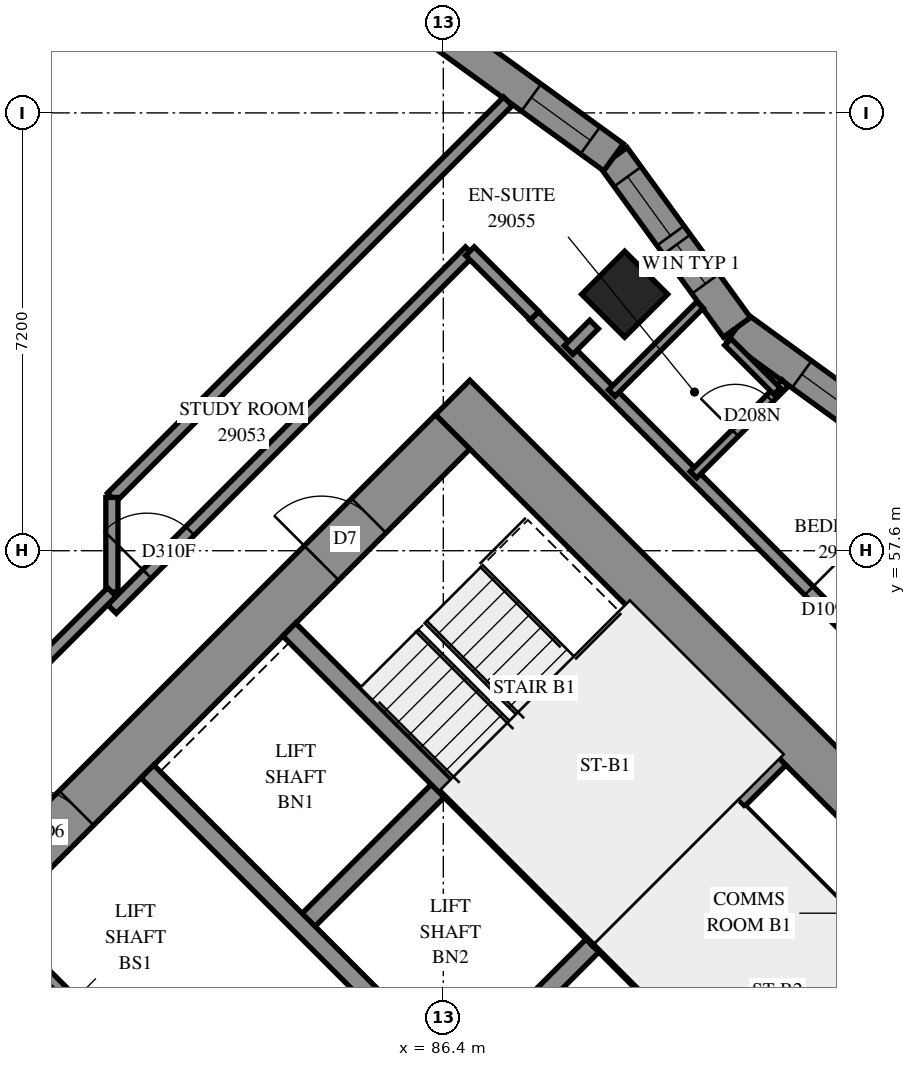
"""IFC4 building model, lengths in metres.
Left out: names, types, materials, properties, quantities, classifications, styles, units other than length and angle.
Written with IfcOpenShell. Run it as: python <this file> out.ifc"""

import sys

from ifc_helpers import new_model, si_unit, direction, frame, frame_2d, origin, origin_2d, place, context, subcontext, project, spatial, polyline, rectangle, outline, extrude, element, fill, save


model = new_model("IFC4")
c1 = context("Model", 3, precision=1e-05, world=origin(), true_north=direction((0.0, 1.0)))
c2 = subcontext(c1, "Body", "Model", "MODEL_VIEW")
j1 = project(units=[si_unit("LENGTHUNIT", "METRE"), si_unit("PLANEANGLEUNIT", "RADIAN")], contexts=[c1])
p1 = place(None, origin())
s1 = spatial("IfcSite", under=j1, at=p1, CompositionType="ELEMENT")
p2 = place(p1, origin())
s2 = spatial("IfcBuilding", under=s1, at=p2, CompositionType="ELEMENT")
p3 = place(p2, frame((0.0, 0.0, 108.4)))
s3 = spatial("IfcBuildingStorey", under=s2, at=p3, CompositionType="ELEMENT", Elevation=108.4)
p4 = place(p3, frame((89.382, 61.818, 0.0), z_axis=(0.0, 0.0, 1.0), x_axis=(0.7071067812, -0.7071067812, 0.0)))
e1 = element("IfcColumn", 1, at=p4, inside=s3, PredefinedType="COLUMN", context=c2, shape_type="SweptSolid", body=[
    extrude(rectangle(XDim=1.0, YDim=1.0, at=origin_2d()), origin(), (0.0, 0.0, 1.0), 3.1),
])
p5 = place(p3, frame((86.554, 60.121, -0.3), z_axis=(0.0, 0.0, 1.0), x_axis=(0.7071067812, -0.7071067812, 0.0)))
e2 = element("IfcWall", 2, at=p5, inside=s3, PredefinedType="SHEAR", context=c2, shape_type="SweptSolid", body=[
    extrude(rectangle(XDim=16.0, YDim=0.8, at=frame_2d((8.0, 0.0))), origin(), (0.0, 0.0, 1.0), 2.7),
])
p6 = place(p5, frame((10.8, 0.0, 0.3)))
e3 = element("IfcOpeningElement", 3, at=p6, cuts=e2, PredefinedType="OPENING", context=c2, shape_type="SweptSolid", body=[
    extrude(rectangle(XDim=0.8, YDim=2.1, at=frame_2d((0.4, 1.05))), frame((0.0, 0.41, 0.0), z_axis=(0.0, -1.0, 0.0), x_axis=(1.0, 0.0, 0.0)), (0.0, 0.0, 1.0), 0.82),
])
p7 = place(p3, frame((76.372, 49.373, -0.3), z_axis=(0.0, 0.0, 1.0), x_axis=(0.7071067812, 0.7071067812, 0.0)))
e4 = element("IfcWall", 4, at=p7, inside=s3, PredefinedType="SHEAR", context=c2, shape_type="SweptSolid", body=[
    extrude(rectangle(XDim=14.4, YDim=0.8, at=frame_2d((7.2, 0.0))), origin(), (0.0, 0.0, 1.0), 2.7),
])
p8 = place(p7, frame((4.55, 0.0, 0.3)))
e5 = element("IfcOpeningElement", 5, at=p8, cuts=e4, PredefinedType="OPENING", context=c2, shape_type="SweptSolid", body=[
    extrude(rectangle(XDim=1.1, YDim=2.1, at=frame_2d((0.55, 1.05))), frame((0.0, 0.41, 0.0), z_axis=(0.0, -1.0, 0.0), x_axis=(1.0, 0.0, 0.0)), (0.0, 0.0, 1.0), 0.82),
])
p9 = place(p7, frame((11.35, 0.0, 0.3)))
e6 = element("IfcOpeningElement", 6, at=p9, cuts=e4, PredefinedType="OPENING", context=c2, shape_type="SweptSolid", body=[
    extrude(rectangle(XDim=1.1, YDim=2.1, at=frame_2d((0.55, 1.05))), frame((0.0, 0.41, 0.0), z_axis=(0.0, -1.0, 0.0), x_axis=(1.0, 0.0, 0.0)), (0.0, 0.0, 1.0), 0.82),
])
p10 = place(p3, frame((84.079, 51.423, 0.0), z_axis=(0.0, 0.0, 1.0), x_axis=(0.7071219326, 0.7070916295, 0.0)))
e7 = element("IfcWall", 7, at=p10, inside=s3, PredefinedType="SOLIDWALL", context=c2, shape_type="SweptSolid", body=[
    extrude(rectangle(XDim=3.3, YDim=0.3, at=frame_2d((1.65, 0.0))), origin(), (0.0, 0.0, 1.0), 3.1),
])
p11 = place(p3, frame((86.625, 48.878, 0.0), z_axis=(0.0, 0.0, 1.0), x_axis=(0.7071067812, 0.7071067812, 0.0)))
e8 = element("IfcWall", 8, at=p11, inside=s3, PredefinedType="SOLIDWALL", context=c2, shape_type="SweptSolid", body=[
    extrude(rectangle(XDim=3.3, YDim=0.3, at=frame_2d((1.65, 0.0))), origin(), (0.0, 0.0, 1.0), 3.1),
])
p12 = place(p3, frame((78.988, 51.423, 0.0), z_axis=(0.0, 0.0, 1.0), x_axis=(0.7071067812, -0.7071067812, 0.0)))
e9 = element("IfcWall", 9, at=p12, inside=s3, PredefinedType="SOLIDWALL", context=c2, shape_type="SweptSolid", body=[
    extrude(rectangle(XDim=14.4, YDim=0.3, at=frame_2d((7.2, 0.0))), origin(), (0.0, 0.0, 1.0), 3.1),
])
p13 = place(p12, frame((1.25, 0.0, 0.0)))
e10 = element("IfcOpeningElement", 10, at=p13, cuts=e9, PredefinedType="OPENING", context=c2, shape_type="SweptSolid", body=[
    extrude(rectangle(XDim=1.1, YDim=2.1, at=frame_2d((0.55, 1.05))), frame((0.0, 0.16, 0.0), z_axis=(0.0, -1.0, 0.0), x_axis=(1.0, 0.0, 0.0)), (0.0, 0.0, 1.0), 0.32),
])
p14 = place(p12, frame((4.85, 0.0, 0.0)))
e11 = element("IfcOpeningElement", 11, at=p14, cuts=e9, PredefinedType="OPENING", context=c2, shape_type="SweptSolid", body=[
    extrude(rectangle(XDim=1.1, YDim=2.1, at=frame_2d((0.55, 1.05))), frame((0.0, 0.16, 0.0), z_axis=(0.0, -1.0, 0.0), x_axis=(1.0, 0.0, 0.0)), (0.0, 0.0, 1.0), 0.32),
])
p15 = place(p12, frame((8.45, 0.0, 0.0)))
e12 = element("IfcOpeningElement", 12, at=p15, cuts=e9, PredefinedType="OPENING", context=c2, shape_type="SweptSolid", body=[
    extrude(rectangle(XDim=1.1, YDim=2.1, at=frame_2d((0.55, 1.05))), frame((0.0, 0.16, 0.0), z_axis=(0.0, -1.0, 0.0), x_axis=(1.0, 0.0, 0.0)), (0.0, 0.0, 1.0), 0.32),
])
p16 = place(p12, frame((12.05, 0.0, 0.0)))
e13 = element("IfcOpeningElement", 13, at=p16, cuts=e9, PredefinedType="OPENING", context=c2, shape_type="SweptSolid", body=[
    extrude(rectangle(XDim=1.1, YDim=2.1, at=frame_2d((0.55, 1.05))), frame((0.0, 0.16, 0.0), z_axis=(0.0, -1.0, 0.0), x_axis=(1.0, 0.0, 0.0)), (0.0, 0.0, 1.0), 0.32),
])
p17 = place(p3, frame((81.534, 53.969, 0.0), z_axis=(0.0, 0.0, 1.0), x_axis=(0.707103309, -0.7071102534, 0.0)))
e14 = element("IfcWall", 14, at=p17, inside=s3, PredefinedType="SOLIDWALL", context=c2, shape_type="SweptSolid", body=[
    extrude(rectangle(XDim=14.4, YDim=0.3, at=frame_2d((7.2, 0.0))), origin(), (0.0, 0.0, 1.0), 3.1),
])
p18 = place(p17, frame((12.05, 0.0, 0.0)))
e15 = element("IfcOpeningElement", 15, at=p18, cuts=e14, PredefinedType="OPENING", context=c2, shape_type="SweptSolid", body=[
    extrude(rectangle(XDim=1.1, YDim=2.1, at=frame_2d((0.55, 1.05))), frame((0.0, 0.16, 0.0), z_axis=(0.0, -1.0, 0.0), x_axis=(1.0, 0.0, 0.0)), (0.0, 0.0, 1.0), 0.32),
])
for number, where, z_axis, x_axis in (
    (16, (83.867, 56.302, 0.0), (0.0, 0.0, 1.0), (0.707, -0.707, 0.0)),
    (17, (88.958, 51.211, 0.0), (0.0, 0.0, 1.0), (0.707, -0.707, 0.0)),
):
    element("IfcWall", number, at=place(p3, frame(where, z_axis=z_axis, x_axis=x_axis)), inside=s3, PredefinedType="SOLIDWALL", context=c2, shape_type="SweptSolid", body=[
        extrude(rectangle(XDim=7.2, YDim=0.3, at=frame_2d((3.6, 0.0))), origin(), (0.0, 0.0, 1.0), 3.1),
    ])
p19 = place(p3, frame((88.958, 51.211, 0.0), z_axis=(0.0, 0.0, 1.0), x_axis=(0.7071067812, 0.7071067812, 0.0)))
e18 = element("IfcWall", 18, at=p19, inside=s3, PredefinedType="SOLIDWALL", context=c2, shape_type="SweptSolid", body=[
    extrude(rectangle(XDim=4.2, YDim=0.3, at=frame_2d((2.1, 0.0))), origin(), (0.0, 0.0, 1.0), 3.1),
])
p20 = place(p3, frame((94.025, 59.244, 0.0), z_axis=(0.0, 0.0, 1.0), x_axis=(-0.8092802019, 0.5874228075, 0.0)))
e19 = element("IfcWall", 19, at=p20, inside=s3, PredefinedType="SOLIDWALL", context=c2, shape_type="SweptSolid", body=[
    extrude(outline(polyline([(-0.044, -0.275), (3.411, -0.275), (3.499, 0.275), (0.044, 0.275), (-0.044, -0.275)])), origin(), (0.0, 0.0, 1.0), 3.1),
])
p21 = place(p20, frame((0.938, 0.0, 0.5)))
e20 = element("IfcOpeningElement", 20, at=p21, cuts=e19, PredefinedType="OPENING", context=c2, shape_type="SweptSolid", body=[
    extrude(rectangle(XDim=1.2, YDim=2.45, at=frame_2d((0.6, 1.225))), frame((0.0, 0.285, 0.0), z_axis=(0.0, -1.0, 0.0), x_axis=(1.0, 0.0, 0.0)), (0.0, 0.0, 1.0), 0.57),
])
p22 = place(p3, frame((91.23, 61.274, 0.0), z_axis=(0.0, 0.0, 1.0), x_axis=(-0.5874228075, 0.8092802019, 0.0)))
e21 = element("IfcWall", 21, at=p22, inside=s3, PredefinedType="SOLIDWALL", context=c2, shape_type="SweptSolid", body=[
    extrude(outline(polyline([(0.044, -0.275), (3.499, -0.275), (3.411, 0.275), (-0.044, 0.275), (0.044, -0.275)])), origin(), (0.0, 0.0, 1.0), 3.1),
])
p23 = place(p22, frame((1.862, 0.0, 0.5)))
e22 = element("IfcOpeningElement", 22, at=p23, cuts=e21, PredefinedType="OPENING", context=c2, shape_type="SweptSolid", body=[
    extrude(rectangle(XDim=1.2, YDim=2.45, at=frame_2d((0.6, 1.225))), frame((0.0, 0.285, 0.0), z_axis=(0.0, -1.0, 0.0), x_axis=(1.0, 0.0, 0.0)), (0.0, 0.0, 1.0), 0.57),
])
p24 = place(p22, frame((0.883, 0.0, 0.45)))
e23 = element("IfcOpeningElement", 23, at=p24, cuts=e21, PredefinedType="OPENING", context=c2, shape_type="SweptSolid", body=[
    extrude(rectangle(XDim=0.8, YDim=2.5, at=frame_2d((0.4, 1.25))), frame((0.0, 0.285, 0.0), z_axis=(0.0, -1.0, 0.0), x_axis=(1.0, 0.0, 0.0)), (0.0, 0.0, 1.0), 0.57),
])
p25 = place(p3, frame((89.2, 64.07, 0.0), z_axis=(0.0, 0.0, 1.0), x_axis=(-0.8092802019, 0.5874228075, 0.0)))
e24 = element("IfcWall", 24, at=p25, inside=s3, PredefinedType="SOLIDWALL", context=c2, shape_type="SweptSolid", body=[
    extrude(outline(polyline([(-0.044, -0.275), (3.411, -0.275), (3.499, 0.275), (0.044, 0.275), (-0.044, -0.275)])), origin(), (0.0, 0.0, 1.0), 3.1),
])
p26 = place(p25, frame((0.473, 0.0, 0.5)))
e25 = element("IfcOpeningElement", 25, at=p26, cuts=e24, PredefinedType="OPENING", context=c2, shape_type="SweptSolid", body=[
    extrude(rectangle(XDim=1.2, YDim=2.45, at=frame_2d((0.6, 1.225))), frame((0.0, 0.285, 0.0), z_axis=(0.0, -1.0, 0.0), x_axis=(1.0, 0.0, 0.0)), (0.0, 0.0, 1.0), 0.57),
])
p27 = place(p3, frame((91.313, 53.354, 0.0), z_axis=(0.0, 0.0, 1.0), x_axis=(0.7071067812, -0.7071067812, 0.0)))
e26 = element("IfcWall", 26, at=p27, inside=s3, PredefinedType="PARTITIONING", context=c2, shape_type="SweptSolid", body=[
    extrude(rectangle(XDim=5.95, YDim=0.15, at=frame_2d((2.975, 0.0))), origin(), (0.0, 0.0, 1.0), 3.1),
])
p28 = place(p3, frame((87.894, 61.461, 0.0), z_axis=(0.0, 0.0, 1.0), x_axis=(0.7071067812, -0.7071067812, 0.0)))
e27 = element("IfcWall", 27, at=p28, inside=s3, PredefinedType="PARTITIONING", context=c2, shape_type="SweptSolid", body=[
    extrude(rectangle(XDim=10.428, YDim=0.2, at=frame_2d((5.214, 0.0))), origin(), (0.0, 0.0, 1.0), 3.1),
])
p29 = place(p28, frame((6.39, 0.0, 0.0)))
e28 = element("IfcOpeningElement", 28, at=p29, cuts=e27, PredefinedType="OPENING", context=c2, shape_type="SweptSolid", body=[
    extrude(rectangle(XDim=0.9, YDim=2.1, at=frame_2d((0.45, 1.05))), frame((0.0, 0.11, 0.0), z_axis=(0.0, -1.0, 0.0), x_axis=(1.0, 0.0, 0.0)), (0.0, 0.0, 1.0), 0.22),
])
p30 = place(p3, frame((80.949, 58.477, 0.0), z_axis=(0.0, 0.0, 1.0), x_axis=(0.7071067812, 0.7071067812, 0.0)))
e29 = element("IfcWall", 29, at=p30, inside=s3, PredefinedType="PARTITIONING", context=c2, shape_type="SweptSolid", body=[
    extrude(rectangle(XDim=9.212, YDim=0.2, at=frame_2d((4.606, 0.0))), origin(), (0.0, 0.0, 1.0), 3.1),
])
p31 = place(p3, frame((80.951, 56.641, 0.0), z_axis=(0.0, 0.0, 1.0), x_axis=(0.7071067812, 0.7071067812, 0.0)))
e30 = element("IfcWall", 30, at=p31, inside=s3, PredefinedType="PARTITIONING", context=c2, shape_type="SweptSolid", body=[
    extrude(rectangle(XDim=8.321, YDim=0.2, at=frame_2d((4.161, 0.0))), origin(), (0.0, 0.0, 1.0), 3.1),
])
p32 = place(p31, frame((0.816, 0.0, 0.0)))
e31 = element("IfcOpeningElement", 31, at=p32, cuts=e30, PredefinedType="OPENING", context=c2, shape_type="SweptSolid", body=[
    extrude(rectangle(XDim=1.0, YDim=2.1, at=frame_2d((0.5, 1.05))), frame((0.0, 0.11, 0.0), z_axis=(0.0, -1.0, 0.0), x_axis=(1.0, 0.0, 0.0)), (0.0, 0.0, 1.0), 0.22),
])
p33 = place(p3, frame((90.513, 58.849, 0.0), z_axis=(0.0, 0.0, 1.0), x_axis=(0.7071302035, 0.7070833581, 0.0)))
e32 = element("IfcWall", 32, at=p33, inside=s3, PredefinedType="PARTITIONING", context=c2, shape_type="SweptSolid", body=[
    extrude(rectangle(XDim=2.135, YDim=0.15, at=frame_2d((1.067, 0.0))), origin(), (0.0, 0.0, 1.0), 3.1),
])
p34 = place(p33, frame((0.972, 0.0, 0.0)))
e33 = element("IfcOpeningElement", 33, at=p34, cuts=e32, PredefinedType="OPENING", context=c2, shape_type="SweptSolid", body=[
    extrude(rectangle(XDim=0.8, YDim=2.1, at=frame_2d((0.4, 1.05))), frame((0.0, 0.085, 0.0), z_axis=(0.0, -1.0, 0.0), x_axis=(1.0, 0.0, 0.0)), (0.0, 0.0, 1.0), 0.17),
])
p35 = place(p3, frame((89.169, 60.193, 0.0), z_axis=(0.0, 0.0, 1.0), x_axis=(0.7076425233, 0.7065706329, 0.0)))
e34 = element("IfcWall", 34, at=p35, inside=s3, PredefinedType="PARTITIONING", context=c2, shape_type="SweptSolid", body=[
    extrude(rectangle(XDim=2.052, YDim=0.15, at=frame_2d((1.026, 0.0))), origin(), (0.0, 0.0, 1.0), 3.1),
])
p36 = place(p3, frame((80.95, 56.92, 0.0), z_axis=(0.0, 0.0, 1.0), x_axis=(0.0, 1.0, 0.0)))
e35 = element("IfcWall", 35, at=p36, inside=s3, PredefinedType="PARTITIONING", context=c2, shape_type="SweptSolid", body=[
    extrude(rectangle(XDim=1.556, YDim=0.2, at=frame_2d((0.778, 0.0))), origin(), (0.0, 0.0, 1.0), 3.1),
])
p37 = place(p3, frame((79.879, 55.851, 0.0), z_axis=(0.0, 0.0, 1.0), x_axis=(0.7071067812, 0.7071067812, 0.0)))
e36 = element("IfcWall", 36, at=p37, inside=s3, PredefinedType="PARTITIONING", context=c2, shape_type="SweptSolid", body=[
    extrude(rectangle(XDim=1.513, YDim=0.2, at=frame_2d((0.757, 0.0))), origin(), (0.0, 0.0, 1.0), 3.1),
])
p38 = place(p3, frame((86.838, 62.526, 0.0), z_axis=(0.0, 0.0, 1.0), x_axis=(0.70777292, -0.7064400143, 0.0)))
e37 = element("IfcWall", 37, at=p38, inside=s3, PredefinedType="PARTITIONING", context=c2, shape_type="SweptSolid", body=[
    extrude(rectangle(XDim=1.5, YDim=0.2, at=frame_2d((0.75, 0.0))), origin(), (0.0, 0.0, 1.0), 3.1),
])
p39 = place(p3, frame((91.08, 61.033, 0.0), z_axis=(0.0, 0.0, 1.0), x_axis=(0.7071067812, -0.7071067812, 0.0)))
e38 = element("IfcWall", 38, at=p39, inside=s3, PredefinedType="PARTITIONING", context=c2, shape_type="SweptSolid", body=[
    extrude(rectangle(XDim=1.145, YDim=0.15, at=frame_2d((0.572, 0.0))), origin(), (0.0, 0.0, 1.0), 3.1),
])
p40 = place(p3, frame((88.461, 60.901, 0.0), z_axis=(0.0, 0.0, 1.0), x_axis=(0.7054171665, 0.7087923682, 0.0)))
e39 = element("IfcWall", 39, at=p40, inside=s3, PredefinedType="PARTITIONING", context=c2, shape_type="SweptSolid", body=[
    extrude(rectangle(XDim=0.593, YDim=0.2, at=frame_2d((0.296, 0.0))), origin(), (0.0, 0.0, 1.0), 3.1),
])
p41 = place(p21, origin())
e40 = element("IfcWindow", 40, at=p41, inside=s3, PartitioningType="SINGLE_PANEL", PredefinedType="WINDOW", context=c2, shape_type="SweptSolid", body=[
    extrude(rectangle(XDim=1.2, YDim=2.45, at=frame_2d((0.6, 1.225))), frame((0.0, 0.155, 0.0), z_axis=(0.0, -1.0, 0.0), x_axis=(1.0, 0.0, 0.0)), (0.0, 0.0, 1.0), 0.06),
])
fill(e20, e40)
p42 = place(p23, origin())
e41 = element("IfcWindow", 41, at=p42, inside=s3, PartitioningType="SINGLE_PANEL", PredefinedType="WINDOW", context=c2, shape_type="SweptSolid", body=[
    extrude(rectangle(XDim=1.2, YDim=2.45, at=frame_2d((0.6, 1.225))), frame((0.0, 0.155, 0.0), z_axis=(0.0, -1.0, 0.0), x_axis=(1.0, 0.0, 0.0)), (0.0, 0.0, 1.0), 0.06),
])
fill(e22, e41)
p43 = place(p26, origin())
e42 = element("IfcWindow", 42, at=p43, inside=s3, PartitioningType="SINGLE_PANEL", PredefinedType="WINDOW", context=c2, shape_type="SweptSolid", body=[
    extrude(rectangle(XDim=1.2, YDim=2.45, at=frame_2d((0.6, 1.225))), frame((0.0, 0.155, 0.0), z_axis=(0.0, -1.0, 0.0), x_axis=(1.0, 0.0, 0.0)), (0.0, 0.0, 1.0), 0.06),
])
fill(e25, e42)
p44 = place(p8, origin())
e43 = element("IfcDoor", 43, at=p44, inside=s3, OperationType="DOUBLE_DOOR_SINGLE_SWING", PredefinedType="DOOR", context=c2, shape_type="SweptSolid", body=[
    extrude(rectangle(XDim=1.1, YDim=2.1, at=frame_2d((0.55, 1.05))), frame((0.0, 0.025, 0.0), z_axis=(0.0, -1.0, 0.0), x_axis=(1.0, 0.0, 0.0)), (0.0, 0.0, 1.0), 0.05),
])
fill(e5, e43)
p45 = place(p9, origin())
e44 = element("IfcDoor", 44, at=p45, inside=s3, OperationType="SINGLE_SWING_LEFT", PredefinedType="DOOR", context=c2, shape_type="SweptSolid", body=[
    extrude(rectangle(XDim=1.1, YDim=2.1, at=frame_2d((0.55, 1.05))), frame((0.0, 0.025, 0.0), z_axis=(0.0, -1.0, 0.0), x_axis=(1.0, 0.0, 0.0)), (0.0, 0.0, 1.0), 0.05),
])
fill(e6, e44)
p46 = place(p13, origin())
e45 = element("IfcDoor", 45, at=p46, inside=s3, OperationType="SLIDING_TO_LEFT", PredefinedType="DOOR", context=c2, shape_type="SweptSolid", body=[
    extrude(rectangle(XDim=1.1, YDim=2.1, at=frame_2d((0.55, 1.05))), frame((0.0, 0.025, 0.0), z_axis=(0.0, -1.0, 0.0), x_axis=(1.0, 0.0, 0.0)), (0.0, 0.0, 1.0), 0.05),
])
fill(e10, e45)
p47 = place(p32, origin())
e46 = element("IfcDoor", 46, at=p47, inside=s3, OperationType="SINGLE_SWING_RIGHT", PredefinedType="DOOR", context=c2, shape_type="SweptSolid", body=[
    extrude(rectangle(XDim=1.0, YDim=2.1, at=frame_2d((0.5, 1.05))), frame((0.0, 0.025, 0.0), z_axis=(0.0, -1.0, 0.0), x_axis=(1.0, 0.0, 0.0)), (0.0, 0.0, 1.0), 0.05),
])
fill(e31, e46)
p48 = place(p29, origin())
e47 = element("IfcDoor", 47, at=p48, inside=s3, OperationType="SINGLE_SWING_LEFT", PredefinedType="DOOR", context=c2, shape_type="SweptSolid", body=[
    extrude(rectangle(XDim=0.9, YDim=2.1, at=frame_2d((0.45, 1.05))), frame((0.0, 0.025, 0.0), z_axis=(0.0, -1.0, 0.0), x_axis=(1.0, 0.0, 0.0)), (0.0, 0.0, 1.0), 0.05),
])
fill(e28, e47)
p49 = place(p34, origin())
e48 = element("IfcDoor", 48, at=p49, inside=s3, OperationType="SINGLE_SWING_RIGHT", PredefinedType="DOOR", context=c2, shape_type="SweptSolid", body=[
    extrude(rectangle(XDim=0.8, YDim=2.1, at=frame_2d((0.4, 1.05))), frame((0.0, 0.025, 0.0), z_axis=(0.0, -1.0, 0.0), x_axis=(1.0, 0.0, 0.0)), (0.0, 0.0, 1.0), 0.05),
])
fill(e33, e48)
p50 = place(p24, origin())
e49 = element("IfcWindow", 49, at=p50, inside=s3, PartitioningType="SINGLE_PANEL", PredefinedType="WINDOW", context=c2, shape_type="SweptSolid", body=[
    extrude(rectangle(XDim=0.8, YDim=2.5, at=frame_2d((0.4, 1.25))), frame((0.0, 0.155, 0.0), z_axis=(0.0, -1.0, 0.0), x_axis=(1.0, 0.0, 0.0)), (0.0, 0.0, 1.0), 0.06),
])
fill(e23, e49)
save(model, sys.argv[1])
